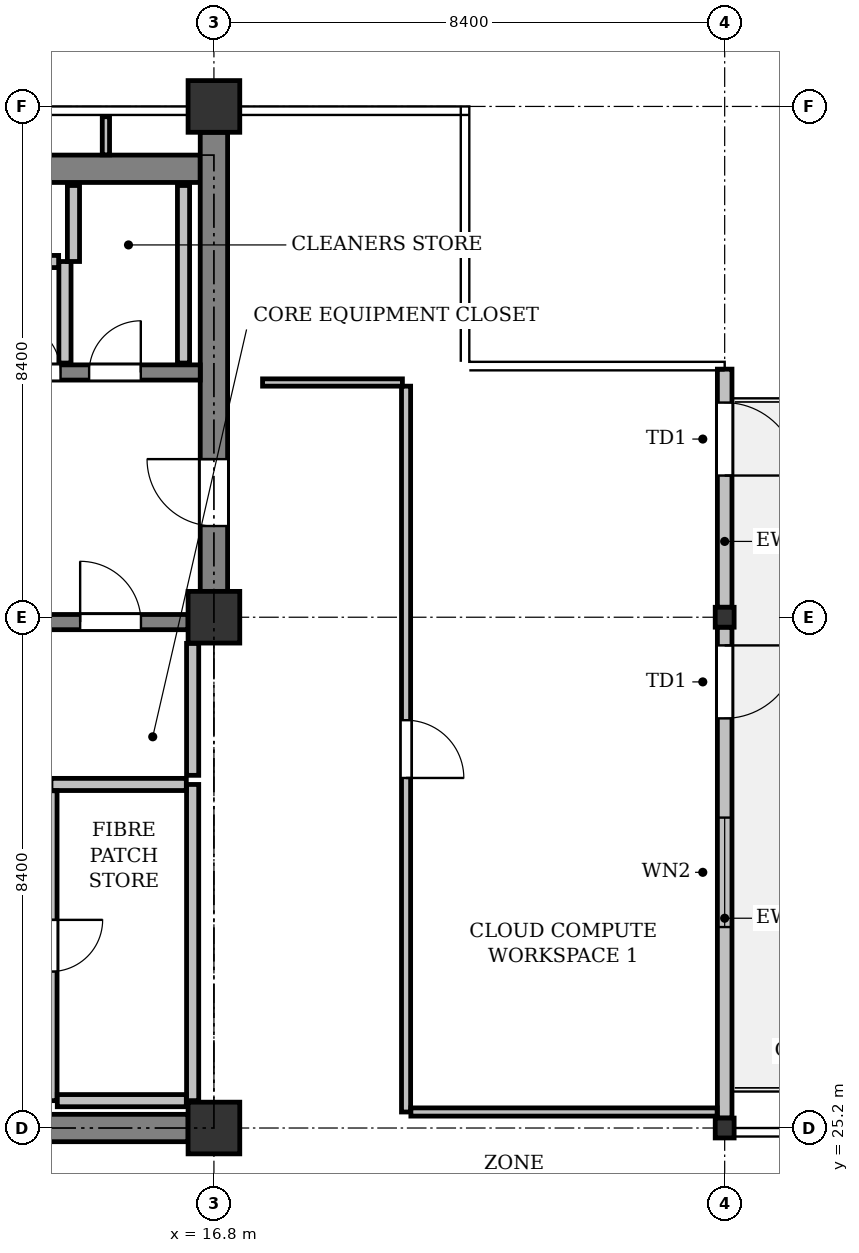
"""IFC4 building model, lengths in metres.
Left out: names, types, materials, properties, quantities, classifications, styles, units other than length and angle.
Written with IfcOpenShell. Run it as: python <this file> out.ifc"""

import sys

from ifc_helpers import new_model, si_unit, direction, frame, frame_2d, origin, origin_2d, place, context, subcontext, project, spatial, rectangle, i_section, extrude, element, fill, save


model = new_model("IFC4")
c1 = context("Model", 3, precision=1e-05, world=origin(), true_north=direction((0.0, 1.0)))
c2 = subcontext(c1, "Body", "Model", "MODEL_VIEW")
j1 = project(units=[si_unit("LENGTHUNIT", "METRE"), si_unit("PLANEANGLEUNIT", "RADIAN")], contexts=[c1])
p1 = place(None, origin())
s1 = spatial("IfcSite", under=j1, at=p1, CompositionType="ELEMENT")
p2 = place(p1, origin())
s2 = spatial("IfcBuilding", under=s1, at=p2, CompositionType="ELEMENT")
p3 = place(p2, frame((0.0, 0.0, 302.2)))
s3 = spatial("IfcBuildingStorey", under=s2, at=p3, CompositionType="ELEMENT", Elevation=302.2)
for number, where, z_axis, x_axis in (
    (1, (16.8, 25.2, 0.0), (0.0, 0.0, 1.0), (1.0, 0.0, 0.0)),
    (2, (16.8, 33.6, 0.0), (0.0, 0.0, 1.0), (1.0, 0.0, 0.0)),
    (3, (16.8, 42.0, 0.0), (0.0, 0.0, 1.0), (1.0, 0.0, 0.0)),
):
    element("IfcColumn", number, at=place(p3, frame(where, z_axis=z_axis, x_axis=x_axis)), inside=s3, PredefinedType="COLUMN", context=c2, shape_type="SweptSolid", body=[
        extrude(rectangle(XDim=0.85, YDim=0.85, at=origin_2d()), origin(), (0.0, 0.0, 1.0), 4.0),
    ])
for number, where, z_axis, x_axis in (
    (4, (25.2, 25.2, 0.0), (0.0, 0.0, 1.0), (1.0, 0.0, 0.0)),
    (5, (25.2, 33.6, 0.0), (0.0, 0.0, 1.0), (1.0, 0.0, 0.0)),
):
    element("IfcColumn", number, at=place(p3, frame(where, z_axis=z_axis, x_axis=x_axis)), inside=s3, PredefinedType="COLUMN", context=c2, shape_type="SweptSolid", body=[
        extrude(i_section(OverallWidth=0.311, OverallDepth=0.327, WebThickness=0.016, FlangeThickness=0.025, FilletRadius=0.017, at=origin_2d()), origin(), (0.0, 0.0, 1.0), 4.0),
    ])
p4 = place(p3, frame((25.2, 37.68, 0.0), z_axis=(0.0, 0.0, 1.0), x_axis=(0.0, -1.0, 0.0)))
e6 = element("IfcWall", 6, at=p4, inside=s3, PredefinedType="STANDARD", context=c2, shape_type="SweptSolid", body=[
    extrude(rectangle(XDim=3.917, YDim=0.24, at=frame_2d((1.958, 0.0))), origin(), (0.0, 0.0, 1.0), 3.725),
])
p5 = place(p4, frame((0.55, 0.0, 0.0)))
e7 = element("IfcOpeningElement", 7, at=p5, cuts=e6, PredefinedType="OPENING", context=c2, shape_type="SweptSolid", body=[
    extrude(rectangle(XDim=1.2, YDim=2.2, at=frame_2d((0.6, 1.1))), frame((0.0, 0.13, 0.0), z_axis=(0.0, -1.0, 0.0), x_axis=(1.0, 0.0, 0.0)), (0.0, 0.0, 1.0), 0.26),
])
p6 = place(p3, frame((25.2, 33.437, 0.0), z_axis=(0.0, 0.0, 1.0), x_axis=(0.0, -1.0, 0.0)))
e8 = element("IfcWall", 8, at=p6, inside=s3, PredefinedType="STANDARD", context=c2, shape_type="SweptSolid", body=[
    extrude(rectangle(XDim=8.073, YDim=0.24, at=frame_2d((4.037, 0.0))), origin(), (0.0, 0.0, 1.0), 3.475),
])
p7 = place(p6, frame((0.3, 0.0, 0.0)))
e9 = element("IfcOpeningElement", 9, at=p7, cuts=e8, PredefinedType="OPENING", context=c2, shape_type="SweptSolid", body=[
    extrude(rectangle(XDim=1.2, YDim=2.2, at=frame_2d((0.6, 1.1))), frame((0.0, 0.13, 0.0), z_axis=(0.0, -1.0, 0.0), x_axis=(1.0, 0.0, 0.0)), (0.0, 0.0, 1.0), 0.26),
])
p8 = place(p6, frame((3.132, 0.0, 0.9)))
e10 = element("IfcOpeningElement", 10, at=p8, cuts=e8, PredefinedType="OPENING", context=c2, shape_type="SweptSolid", body=[
    extrude(rectangle(XDim=1.8, YDim=1.6, at=frame_2d((0.9, 0.8))), frame((0.0, 0.13, 0.0), z_axis=(0.0, -1.0, 0.0), x_axis=(1.0, 0.0, 0.0)), (0.0, 0.0, 1.0), 0.26),
])
p9 = place(p3, frame((8.625, 40.975, 0.0), z_axis=(0.0, 0.0, 1.0), x_axis=(1.0, 0.0, 0.0)))
e11 = element("IfcWall", 11, at=p9, inside=s3, PredefinedType="SHEAR", context=c2, shape_type="SweptSolid", body=[
    extrude(rectangle(XDim=7.95, YDim=0.45, at=frame_2d((3.975, 0.0))), origin(), (0.0, 0.0, 1.0), 3.725),
])
p10 = place(p3, frame((16.8, 34.025, 0.0), z_axis=(0.0, 0.0, 1.0), x_axis=(0.0, 1.0, 0.0)))
e12 = element("IfcWall", 12, at=p10, inside=s3, PredefinedType="SHEAR", context=c2, shape_type="SweptSolid", body=[
    extrude(rectangle(XDim=7.55, YDim=0.45, at=frame_2d((3.775, 0.0))), origin(), (0.0, 0.0, 1.0), 3.725),
])
p11 = place(p10, frame((1.075, 0.0, 0.0)))
e13 = element("IfcOpeningElement", 13, at=p11, cuts=e12, PredefinedType="OPENING", context=c2, shape_type="SweptSolid", body=[
    extrude(rectangle(XDim=1.1, YDim=2.15, at=frame_2d((0.55, 1.075))), frame((0.0, 0.235, 0.0), z_axis=(0.0, -1.0, 0.0), x_axis=(1.0, 0.0, 0.0)), (0.0, 0.0, 1.0), 0.47),
])
p12 = place(p3, frame((8.825, 25.2, 0.0), z_axis=(0.0, 0.0, 1.0), x_axis=(1.0, 0.0, 0.0)))
e14 = element("IfcWall", 14, at=p12, inside=s3, PredefinedType="SHEAR", context=c2, shape_type="SweptSolid", body=[
    extrude(rectangle(XDim=7.55, YDim=0.45, at=frame_2d((3.775, 0.0))), origin(), (0.0, 0.0, 1.0), 3.725),
])
p13 = place(p12, frame((3.875, 0.0, 0.0)))
e15 = element("IfcOpeningElement", 15, at=p13, cuts=e14, PredefinedType="OPENING", context=c2, shape_type="SweptSolid", body=[
    extrude(rectangle(XDim=1.1, YDim=2.15, at=frame_2d((0.55, 1.075))), frame((0.0, 0.235, 0.0), z_axis=(0.0, -1.0, 0.0), x_axis=(1.0, 0.0, 0.0)), (0.0, 0.0, 1.0), 0.47),
])
p14 = place(p3, frame((12.45, 33.52, 0.0), z_axis=(0.0, 0.0, 1.0), x_axis=(1.0, 0.0, 0.0)))
e16 = element("IfcWall", 16, at=p14, inside=s3, PredefinedType="SHEAR", context=c2, shape_type="SweptSolid", body=[
    extrude(rectangle(XDim=3.925, YDim=0.25, at=frame_2d((1.962, 0.0))), origin(), (0.0, 0.0, 1.0), 3.725),
])
p15 = place(p14, frame((2.15, 0.0, 0.0)))
e17 = element("IfcOpeningElement", 17, at=p15, cuts=e16, PredefinedType="OPENING", context=c2, shape_type="SweptSolid", body=[
    extrude(rectangle(XDim=1.0, YDim=2.15, at=frame_2d((0.5, 1.075))), frame((0.0, 0.135, 0.0), z_axis=(0.0, -1.0, 0.0), x_axis=(1.0, 0.0, 0.0)), (0.0, 0.0, 1.0), 0.27),
])
p16 = place(p3, frame((12.45, 37.625, 0.0), z_axis=(0.0, 0.0, 1.0), x_axis=(1.0, 0.0, 0.0)))
e18 = element("IfcWall", 18, at=p16, inside=s3, PredefinedType="SHEAR", context=c2, shape_type="SweptSolid", body=[
    extrude(rectangle(XDim=4.125, YDim=0.25, at=frame_2d((2.062, 0.0))), origin(), (0.0, 0.0, 1.0), 3.725),
])
p17 = place(p16, frame((0.978, 0.0, 0.0)))
e19 = element("IfcOpeningElement", 19, at=p17, cuts=e18, PredefinedType="OPENING", context=c2, shape_type="SweptSolid", body=[
    extrude(rectangle(XDim=0.85, YDim=2.15, at=frame_2d((0.425, 1.075))), frame((0.0, 0.135, 0.0), z_axis=(0.0, -1.0, 0.0), x_axis=(1.0, 0.0, 0.0)), (0.0, 0.0, 1.0), 0.27),
])
p18 = place(p16, frame((2.298, 0.0, 0.0)))
e20 = element("IfcOpeningElement", 20, at=p18, cuts=e18, PredefinedType="OPENING", context=c2, shape_type="SweptSolid", body=[
    extrude(rectangle(XDim=0.85, YDim=2.15, at=frame_2d((0.425, 1.075))), frame((0.0, 0.135, 0.0), z_axis=(0.0, -1.0, 0.0), x_axis=(1.0, 0.0, 0.0)), (0.0, 0.0, 1.0), 0.27),
])
p19 = place(p3, frame((16.45, 25.65, 0.0), z_axis=(0.0, 0.0, 1.0), x_axis=(0.0, 1.0, 0.0)))
e21 = element("IfcWall", 21, at=p19, inside=s3, PredefinedType="PARTITIONING", context=c2, shape_type="SweptSolid", body=[
    extrude(rectangle(XDim=5.2, YDim=0.2, at=frame_2d((2.6, 0.0))), origin(), (0.0, 0.0, 1.0), 3.725),
])
p20 = place(p3, frame((16.346, 30.85, 0.0), z_axis=(0.0, 0.0, 1.0), x_axis=(-1.0, 0.0, 0.0)))
e22 = element("IfcWall", 22, at=p20, inside=s3, PredefinedType="PARTITIONING", context=c2, shape_type="SweptSolid", body=[
    extrude(rectangle(XDim=2.226, YDim=0.2, at=frame_2d((1.113, 0.0))), origin(), (0.0, 0.0, 1.0), 3.725),
])
p21 = place(p3, frame((14.12, 30.746, 0.0), z_axis=(0.0, 0.0, 1.0), x_axis=(0.0, -1.0, 0.0)))
e23 = element("IfcWall", 23, at=p21, inside=s3, PredefinedType="PARTITIONING", context=c2, shape_type="SweptSolid", body=[
    extrude(rectangle(XDim=5.096, YDim=0.2, at=frame_2d((2.548, 0.0))), origin(), (0.0, 0.0, 1.0), 3.725),
])
p22 = place(p21, frame((2.123, 0.0, 0.0)))
e24 = element("IfcOpeningElement", 24, at=p22, cuts=e23, PredefinedType="OPENING", context=c2, shape_type="SweptSolid", body=[
    extrude(rectangle(XDim=0.85, YDim=2.15, at=frame_2d((0.425, 1.075))), frame((0.0, 0.11, 0.0), z_axis=(0.0, -1.0, 0.0), x_axis=(1.0, 0.0, 0.0)), (0.0, 0.0, 1.0), 0.22),
])
p23 = place(p3, frame((14.224, 25.65, 0.0), z_axis=(0.0, 0.0, 1.0), x_axis=(1.0, 0.0, 0.0)))
e25 = element("IfcWall", 25, at=p23, inside=s3, PredefinedType="PARTITIONING", context=c2, shape_type="SweptSolid", body=[
    extrude(rectangle(XDim=2.122, YDim=0.2, at=frame_2d((1.061, 0.0))), origin(), (0.0, 0.0, 1.0), 3.725),
])
p24 = place(p3, frame((16.45, 31.0, 0.0), z_axis=(0.0, 0.0, 1.0), x_axis=(0.0, 1.0, 0.0)))
e26 = element("IfcWall", 26, at=p24, inside=s3, PredefinedType="PARTITIONING", context=c2, shape_type="SweptSolid", body=[
    extrude(rectangle(XDim=2.17, YDim=0.2, at=frame_2d((1.085, 0.0))), origin(), (0.0, 0.0, 1.0), 3.725),
])
p25 = place(p3, frame((14.35, 37.78, 0.0), z_axis=(0.0, 0.0, 1.0), x_axis=(0.0, 1.0, 0.0)))
e27 = element("IfcWall", 27, at=p25, inside=s3, PredefinedType="PARTITIONING", context=c2, shape_type="SweptSolid", body=[
    extrude(rectangle(XDim=1.67, YDim=0.2, at=frame_2d((0.835, 0.0))), origin(), (0.0, 0.0, 1.0), 2.775),
])
p26 = place(p3, frame((14.246, 39.45, 0.0), z_axis=(0.0, 0.0, 1.0), x_axis=(-1.0, 0.0, 0.0)))
e28 = element("IfcWall", 28, at=p26, inside=s3, PredefinedType="PARTITIONING", context=c2, shape_type="SweptSolid", body=[
    extrude(rectangle(XDim=1.796, YDim=0.2, at=frame_2d((0.898, 0.0))), origin(), (0.0, 0.0, 1.0), 2.775),
])
p27 = place(p3, frame((16.3, 37.78, 0.0), z_axis=(0.0, 0.0, 1.0), x_axis=(0.0, 1.0, 0.0)))
e29 = element("IfcWall", 29, at=p27, inside=s3, PredefinedType="PARTITIONING", context=c2, shape_type="SweptSolid", body=[
    extrude(rectangle(XDim=2.92, YDim=0.2, at=frame_2d((1.46, 0.0))), origin(), (0.0, 0.0, 1.0), 2.775),
])
p28 = place(p3, frame((14.49, 40.7, 0.0), z_axis=(0.0, 0.0, 1.0), x_axis=(0.0, -1.0, 0.0)))
e30 = element("IfcWall", 30, at=p28, inside=s3, PredefinedType="PARTITIONING", context=c2, shape_type="SweptSolid", body=[
    extrude(rectangle(XDim=1.25, YDim=0.2, at=frame_2d((0.625, 0.0))), origin(), (0.0, 0.0, 1.0), 2.775),
])
p29 = place(p3, frame((15.023, 41.204, 0.0), z_axis=(0.0, 0.0, 1.0), x_axis=(0.0, 1.0, 0.0)))
e31 = element("IfcWall", 31, at=p29, inside=s3, PredefinedType="PARTITIONING", context=c2, shape_type="SweptSolid", body=[
    extrude(rectangle(XDim=0.627, YDim=0.12, at=frame_2d((0.313, 0.0))), origin(), (0.0, 0.0, 1.0), 3.725),
])
p30 = place(p3, frame((19.96, 37.4, 0.0), z_axis=(0.0, 0.0, 1.0), x_axis=(0.0, -1.0, 0.0)))
e32 = element("IfcWall", 32, at=p30, inside=s3, PredefinedType="PARTITIONING", context=c2, shape_type="SweptSolid", body=[
    extrude(rectangle(XDim=11.937, YDim=0.15, at=frame_2d((5.968, 0.0))), origin(), (0.0, 0.0, 1.0), 3.271),
])
p31 = place(p30, frame((5.493, 0.0, 0.0)))
e33 = element("IfcOpeningElement", 33, at=p31, cuts=e32, PredefinedType="OPENING", context=c2, shape_type="SweptSolid", body=[
    extrude(rectangle(XDim=0.95, YDim=2.15, at=frame_2d((0.475, 1.075))), frame((0.0, 0.085, 0.0), z_axis=(0.0, -1.0, 0.0), x_axis=(1.0, 0.0, 0.0)), (0.0, 0.0, 1.0), 0.17),
])
p32 = place(p3, frame((20.039, 25.463, 0.0), z_axis=(0.0, 0.0, 1.0), x_axis=(1.0, 0.0, 0.0)))
e34 = element("IfcWall", 34, at=p32, inside=s3, PredefinedType="PARTITIONING", context=c2, shape_type="SweptSolid", body=[
    extrude(rectangle(XDim=5.037, YDim=0.135, at=frame_2d((2.519, 0.0))), origin(), (0.0, 0.0, 1.0), 3.421),
])
p33 = place(p3, frame((17.6, 37.46, 0.0), z_axis=(0.0, 0.0, 1.0), x_axis=(1.0, 0.0, 0.0)))
e35 = element("IfcWall", 35, at=p33, inside=s3, PredefinedType="PARTITIONING", context=c2, shape_type="SweptSolid", body=[
    extrude(rectangle(XDim=2.3, YDim=0.12, at=frame_2d((1.15, 0.0))), origin(), (0.0, 0.0, 1.0), 3.725),
])
p34 = place(p5, origin())
e36 = element("IfcDoor", 36, at=p34, inside=s3, OperationType="SINGLE_SWING_RIGHT", PredefinedType="DOOR", context=c2, shape_type="SweptSolid", body=[
    extrude(rectangle(XDim=1.2, YDim=2.2, at=frame_2d((0.6, 1.1))), frame((0.0, 0.025, 0.0), z_axis=(0.0, -1.0, 0.0), x_axis=(1.0, 0.0, 0.0)), (0.0, 0.0, 1.0), 0.05),
])
fill(e7, e36)
p35 = place(p7, origin())
e37 = element("IfcDoor", 37, at=p35, inside=s3, OperationType="SINGLE_SWING_LEFT", PredefinedType="DOOR", context=c2, shape_type="SweptSolid", body=[
    extrude(rectangle(XDim=1.2, YDim=2.2, at=frame_2d((0.6, 1.1))), frame((0.0, 0.025, 0.0), z_axis=(0.0, -1.0, 0.0), x_axis=(1.0, 0.0, 0.0)), (0.0, 0.0, 1.0), 0.05),
])
fill(e9, e37)
p36 = place(p8, origin())
e38 = element("IfcWindow", 38, at=p36, inside=s3, PartitioningType="SINGLE_PANEL", PredefinedType="WINDOW", context=c2, shape_type="SweptSolid", body=[
    extrude(rectangle(XDim=1.8, YDim=1.6, at=frame_2d((0.9, 0.8))), frame((0.0, 0.03, 0.0), z_axis=(0.0, -1.0, 0.0), x_axis=(1.0, 0.0, 0.0)), (0.0, 0.0, 1.0), 0.06),
])
fill(e10, e38)
p37 = place(p11, origin())
e39 = element("IfcDoor", 39, at=p37, inside=s3, OperationType="SINGLE_SWING_RIGHT", PredefinedType="DOOR", context=c2, shape_type="SweptSolid", body=[
    extrude(rectangle(XDim=1.1, YDim=2.15, at=frame_2d((0.55, 1.075))), frame((0.0, 0.025, 0.0), z_axis=(0.0, -1.0, 0.0), x_axis=(1.0, 0.0, 0.0)), (0.0, 0.0, 1.0), 0.05),
])
fill(e13, e39)
p38 = place(p15, origin())
e40 = element("IfcDoor", 40, at=p38, inside=s3, OperationType="SINGLE_SWING_LEFT", PredefinedType="DOOR", context=c2, shape_type="SweptSolid", body=[
    extrude(rectangle(XDim=1.0, YDim=2.15, at=frame_2d((0.5, 1.075))), frame((0.0, 0.025, 0.0), z_axis=(0.0, -1.0, 0.0), x_axis=(1.0, 0.0, 0.0)), (0.0, 0.0, 1.0), 0.05),
])
fill(e17, e40)
p39 = place(p22, origin())
e41 = element("IfcDoor", 41, at=p39, inside=s3, OperationType="SINGLE_SWING_LEFT", PredefinedType="DOOR", context=c2, shape_type="SweptSolid", body=[
    extrude(rectangle(XDim=0.85, YDim=2.15, at=frame_2d((0.425, 1.075))), frame((0.0, 0.025, 0.0), z_axis=(0.0, -1.0, 0.0), x_axis=(1.0, 0.0, 0.0)), (0.0, 0.0, 1.0), 0.05),
])
fill(e24, e41)
p40 = place(p17, origin())
e42 = element("IfcDoor", 42, at=p40, inside=s3, OperationType="SINGLE_SWING_LEFT", PredefinedType="DOOR", context=c2, shape_type="SweptSolid", body=[
    extrude(rectangle(XDim=0.85, YDim=2.15, at=frame_2d((0.425, 1.075))), frame((0.0, 0.025, 0.0), z_axis=(0.0, -1.0, 0.0), x_axis=(1.0, 0.0, 0.0)), (0.0, 0.0, 1.0), 0.05),
])
fill(e19, e42)
p41 = place(p18, origin())
e43 = element("IfcDoor", 43, at=p41, inside=s3, OperationType="SINGLE_SWING_RIGHT", PredefinedType="DOOR", context=c2, shape_type="SweptSolid", body=[
    extrude(rectangle(XDim=0.85, YDim=2.15, at=frame_2d((0.425, 1.075))), frame((0.0, 0.025, 0.0), z_axis=(0.0, -1.0, 0.0), x_axis=(1.0, 0.0, 0.0)), (0.0, 0.0, 1.0), 0.05),
])
fill(e20, e43)
p42 = place(p31, origin())
e44 = element("IfcDoor", 44, at=p42, inside=s3, OperationType="SINGLE_SWING_RIGHT", PredefinedType="DOOR", context=c2, shape_type="SweptSolid", body=[
    extrude(rectangle(XDim=0.95, YDim=2.15, at=frame_2d((0.475, 1.075))), frame((0.0, 0.025, 0.0), z_axis=(0.0, -1.0, 0.0), x_axis=(1.0, 0.0, 0.0)), (0.0, 0.0, 1.0), 0.05),
])
fill(e33, e44)
save(model, sys.argv[1])
